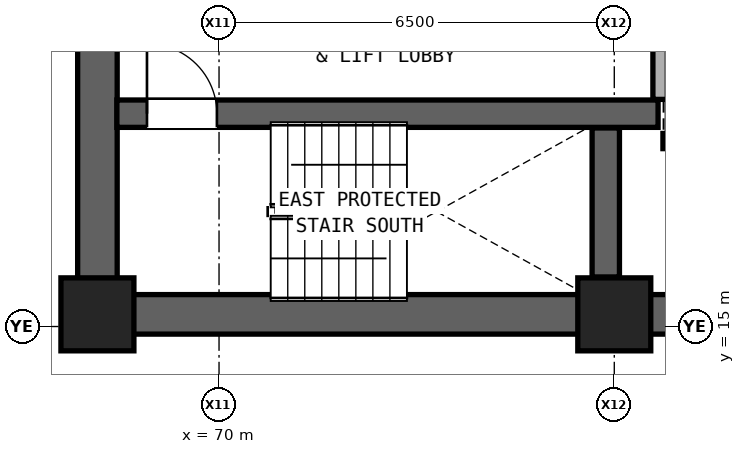
"""IFC4 building model, lengths in metres.
Left out: names, types, materials, properties, quantities, classifications, styles, units other than length and angle.
Written with IfcOpenShell. Run it as: python <this file> out.ifc"""

import sys

from ifc_helpers import new_model, si_unit, direction, frame, frame_2d, origin, origin_2d, place, context, subcontext, project, spatial, rectangle, extrude, element, fill, save


model = new_model("IFC4")
c1 = context("Model", 3, precision=1e-05, world=origin(), true_north=direction((0.0, 1.0)))
c2 = subcontext(c1, "Body", "Model", "MODEL_VIEW")
j1 = project(units=[si_unit("LENGTHUNIT", "METRE"), si_unit("PLANEANGLEUNIT", "RADIAN")], contexts=[c1])
p1 = place(None, origin())
s1 = spatial("IfcSite", under=j1, at=p1, CompositionType="ELEMENT")
p2 = place(p1, origin())
s2 = spatial("IfcBuilding", under=s1, at=p2, CompositionType="ELEMENT")
p3 = place(p2, frame((0.0, 0.0, 95.0)))
s3 = spatial("IfcBuildingStorey", under=s2, at=p3, CompositionType="ELEMENT", Elevation=95.0)
for number, where, z_axis, x_axis in (
    (1, (68.0, 15.2, 0.0), (0.0, 0.0, 1.0), (1.0, 0.0, 0.0)),
    (2, (76.5, 15.2, 0.0), (0.0, 0.0, 1.0), (1.0, 0.0, 0.0)),
):
    element("IfcColumn", number, at=place(p3, frame(where, z_axis=z_axis, x_axis=x_axis)), inside=s3, PredefinedType="COLUMN", context=c2, shape_type="SweptSolid", body=[
        extrude(rectangle(XDim=1.2, YDim=1.2, at=origin_2d()), origin(), (0.0, 0.0, 1.0), 3.3),
    ])
p4 = place(p3, frame((68.0, 15.2, 0.0), z_axis=(0.0, 0.0, 1.0), x_axis=(1.0, 0.0, 0.0)))
e3 = element("IfcWall", 3, at=p4, inside=s3, PredefinedType="SHEAR", context=c2, shape_type="SweptSolid", body=[
    extrude(rectangle(XDim=17.0, YDim=0.65, at=frame_2d((8.5, 0.0))), origin(), (0.0, 0.0, 1.0), 3.08),
])
p5 = place(p3, frame((68.0, 15.2, 0.0), z_axis=(0.0, 0.0, 1.0), x_axis=(0.0, 1.0, 0.0)))
e4 = element("IfcWall", 4, at=p5, inside=s3, PredefinedType="SHEAR", context=c2, shape_type="SweptSolid", body=[
    extrude(rectangle(XDim=5.6, YDim=0.65, at=frame_2d((2.8, 0.0))), origin(), (0.0, 0.0, 1.0), 3.08),
])
p6 = place(p3, frame((77.3, 18.05, 0.0), z_axis=(0.0, 0.0, 1.0), x_axis=(1.0, 0.0, 0.0)))
e5 = element("IfcWall", 5, at=p6, inside=s3, PredefinedType="SOLIDWALL", context=c2, shape_type="SweptSolid", body=[
    extrude(rectangle(XDim=4.35, YDim=0.25, at=frame_2d((2.175, 0.0))), origin(), (0.0, 0.0, 1.0), 3.08),
])
p7 = place(p3, frame((68.32, 18.5, 0.0), z_axis=(0.0, 0.0, 1.0), x_axis=(1.0, 0.0, 0.0)))
e6 = element("IfcWall", 6, at=p7, inside=s3, PredefinedType="SHEAR", context=c2, shape_type="SweptSolid", body=[
    extrude(rectangle(XDim=8.9, YDim=0.45, at=frame_2d((4.45, 0.0))), origin(), (0.0, 0.0, 1.0), 3.08),
])
p8 = place(p7, frame((0.495, 0.0, 0.0)))
e7 = element("IfcOpeningElement", 7, at=p8, cuts=e6, PredefinedType="OPENING", context=c2, shape_type="SweptSolid", body=[
    extrude(rectangle(XDim=1.15, YDim=2.2, at=frame_2d((0.575, 1.1))), frame((0.0, 0.235, 0.0), z_axis=(0.0, -1.0, 0.0), x_axis=(1.0, 0.0, 0.0)), (0.0, 0.0, 1.0), 0.47),
])
p9 = place(p3, frame((76.36, 15.815, 0.0), z_axis=(0.0, 0.0, 1.0), x_axis=(0.0, 1.0, 0.0)))
e8 = element("IfcWall", 8, at=p9, inside=s3, PredefinedType="SHEAR", context=c2, shape_type="SweptSolid", body=[
    extrude(rectangle(XDim=2.45, YDim=0.45, at=frame_2d((1.225, 0.0))), origin(), (0.0, 0.0, 1.0), 3.08),
])
p10 = place(p3, frame((77.26, 18.735, 0.0), z_axis=(0.0, 0.0, 1.0), x_axis=(0.0, 1.0, 0.0)))
e9 = element("IfcWall", 9, at=p10, inside=s3, PredefinedType="SOLIDWALL", context=c2, shape_type="SweptSolid", body=[
    extrude(rectangle(XDim=1.745, YDim=0.25, at=frame_2d((0.873, 0.0))), origin(), (0.0, 0.0, 1.0), 3.08),
])
p11 = place(p8, origin())
e10 = element("IfcDoor", 10, at=p11, inside=s3, OperationType="SINGLE_SWING_LEFT", PredefinedType="DOOR", context=c2, shape_type="SweptSolid", body=[
    extrude(rectangle(XDim=1.15, YDim=2.2, at=frame_2d((0.575, 1.1))), frame((0.0, 0.025, 0.0), z_axis=(0.0, -1.0, 0.0), x_axis=(1.0, 0.0, 0.0)), (0.0, 0.0, 1.0), 0.05),
])
fill(e7, e10)
save(model, sys.argv[1])
